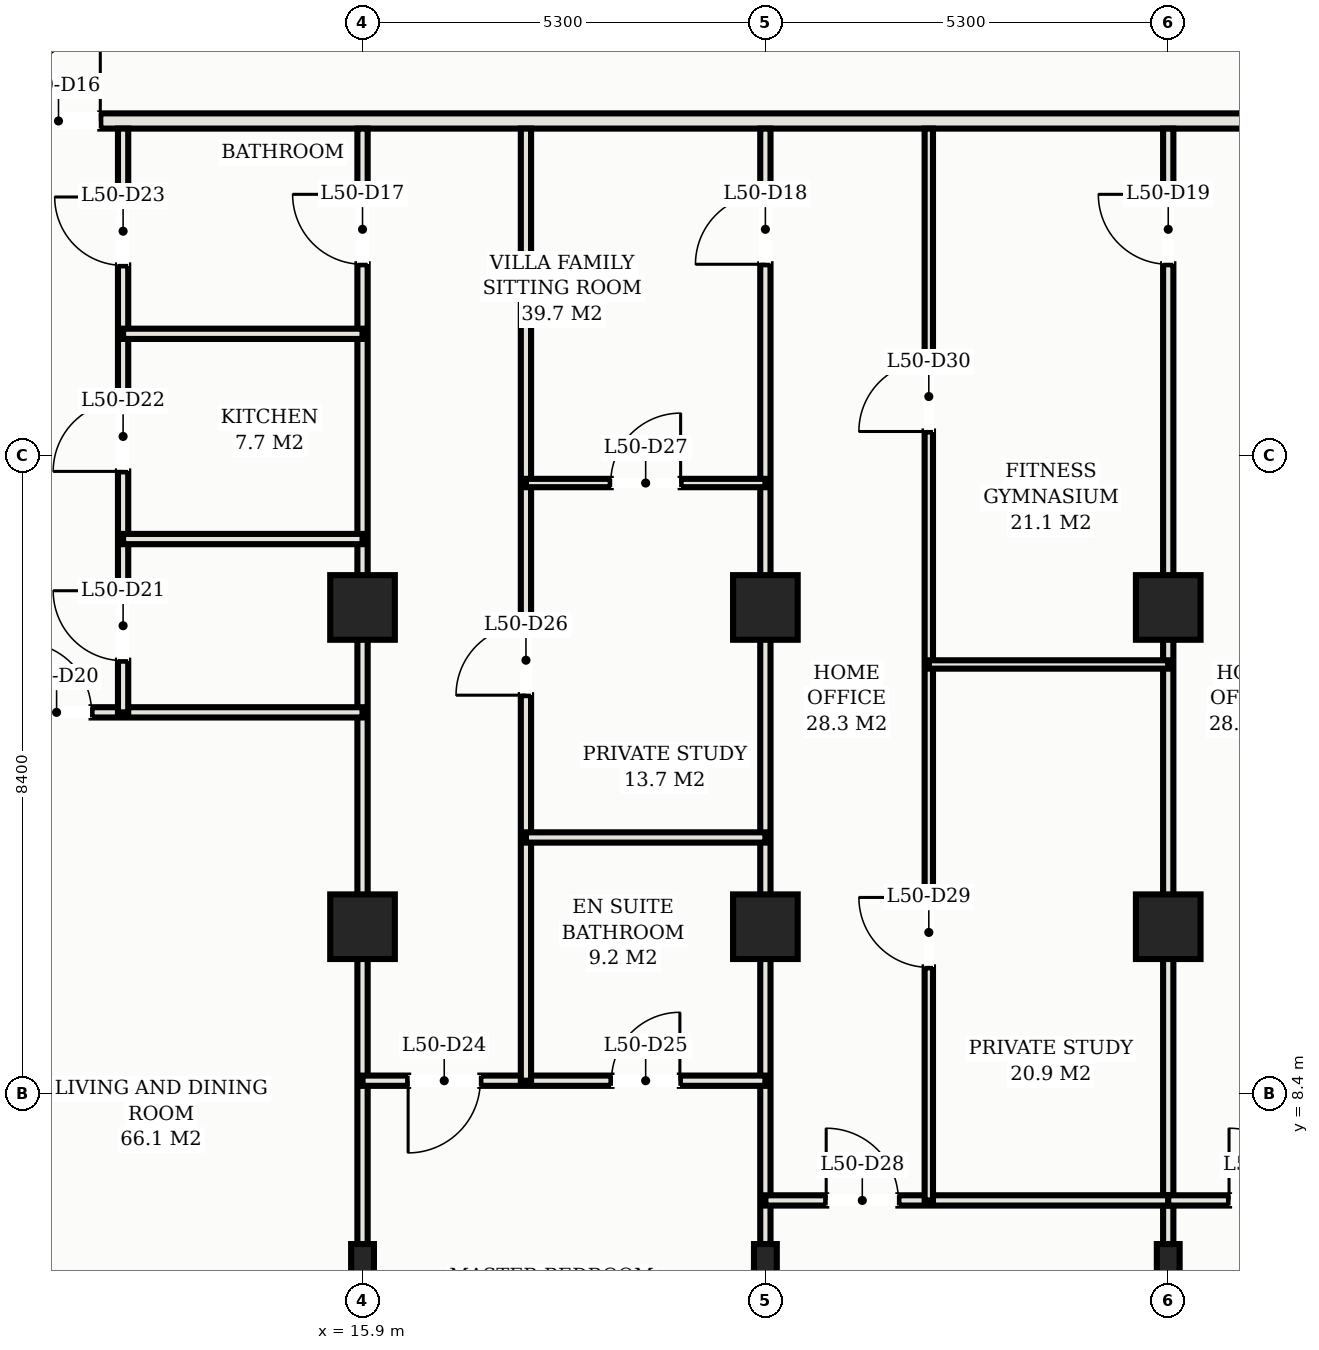
"""IFC4 building model, lengths in metres.
Left out: names, types, materials, properties, quantities, classifications, styles, units other than length and angle.
Written with IfcOpenShell. Run it as: python <this file> out.ifc"""

import sys

from ifc_helpers import new_model, si_unit, direction, frame, frame_2d, origin, origin_2d, place, context, subcontext, project, spatial, rectangle, hollow_rectangle, extrude, element, fill, save


model = new_model("IFC4")
c1 = context("Model", 3, precision=1e-05, world=origin(), true_north=direction((0.0, 1.0)))
c2 = subcontext(c1, "Body", "Model", "MODEL_VIEW")
j1 = project(units=[si_unit("LENGTHUNIT", "METRE"), si_unit("PLANEANGLEUNIT", "RADIAN")], contexts=[c1])
p1 = place(None, origin())
s1 = spatial("IfcSite", under=j1, at=p1, CompositionType="ELEMENT")
p2 = place(p1, origin())
s2 = spatial("IfcBuilding", under=s1, at=p2, CompositionType="ELEMENT")
p3 = place(p2, frame((0.0, 0.0, 182.1)))
s3 = spatial("IfcBuildingStorey", under=s2, at=p3, CompositionType="ELEMENT", Elevation=182.1)
for number, where, z_axis, x_axis in (
    (1, (15.9, 14.8, 0.0), (0.0, 0.0, 1.0), (1.0, 0.0, 0.0)),
    (2, (15.9, 10.6, 0.0), (0.0, 0.0, 1.0), (1.0, 0.0, 0.0)),
    (3, (21.2, 14.8, 0.0), (0.0, 0.0, 1.0), (1.0, 0.0, 0.0)),
    (4, (21.2, 10.6, 0.0), (0.0, 0.0, 1.0), (1.0, 0.0, 0.0)),
    (5, (26.5, 14.8, 0.0), (0.0, 0.0, 1.0), (1.0, 0.0, 0.0)),
    (6, (26.5, 10.6, 0.0), (0.0, 0.0, 1.0), (1.0, 0.0, 0.0)),
):
    element("IfcColumn", number, at=place(p3, frame(where, z_axis=z_axis, x_axis=x_axis)), inside=s3, PredefinedType="COLUMN", context=c2, shape_type="SweptSolid", body=[
        extrude(hollow_rectangle(XDim=0.85, YDim=0.85, WallThickness=0.028, at=origin_2d()), origin(), (0.0, 0.0, 1.0), 3.3),
    ])
for number, where, z_axis, x_axis in (
    (7, (15.9, 6.2, 0.0), (0.0, 0.0, 1.0), (1.0, 0.0, 0.0)),
    (8, (21.2, 6.2, 0.0), (0.0, 0.0, 1.0), (1.0, 0.0, 0.0)),
    (9, (26.5, 6.2, 0.0), (0.0, 0.0, 1.0), (1.0, 0.0, 0.0)),
):
    element("IfcColumn", number, at=place(p3, frame(where, z_axis=z_axis, x_axis=x_axis)), inside=s3, PredefinedType="COLUMN", context=c2, shape_type="SweptSolid", body=[
        extrude(hollow_rectangle(XDim=0.3, YDim=0.45, WallThickness=0.016, at=origin_2d()), origin(), (0.0, 0.0, 1.0), 3.3),
    ])
p4 = place(p3, frame((4.32, 21.2, 0.0), z_axis=(0.0, 0.0, 1.0), x_axis=(1.0, 0.0, 0.0)))
e10 = element("IfcWall", 10, at=p4, inside=s3, PredefinedType="PARTITIONING", context=c2, shape_type="SweptSolid", body=[
    extrude(rectangle(XDim=44.36, YDim=0.2, at=frame_2d((22.18, 0.0))), origin(), (0.0, 0.0, 1.0), 2.57),
])
p5 = place(p4, frame((7.03, 0.0, 0.0)))
e11 = element("IfcOpeningElement", 11, at=p5, cuts=e10, PredefinedType="OPENING", context=c2, shape_type="SweptSolid", body=[
    extrude(rectangle(XDim=1.1, YDim=2.25, at=frame_2d((0.55, 1.125))), frame((0.0, 0.11, 0.0), z_axis=(0.0, -1.0, 0.0), x_axis=(1.0, 0.0, 0.0)), (0.0, 0.0, 1.0), 0.22),
])
p6 = place(p4, frame((28.23, 0.0, 0.0)))
e12 = element("IfcOpeningElement", 12, at=p6, cuts=e10, PredefinedType="OPENING", context=c2, shape_type="SweptSolid", body=[
    extrude(rectangle(XDim=1.1, YDim=2.25, at=frame_2d((0.55, 1.125))), frame((0.0, 0.11, 0.0), z_axis=(0.0, -1.0, 0.0), x_axis=(1.0, 0.0, 0.0)), (0.0, 0.0, 1.0), 0.22),
])
p7 = place(p4, frame((2.635, 0.0, 0.0)))
e13 = element("IfcOpeningElement", 13, at=p7, cuts=e10, PredefinedType="OPENING", context=c2, shape_type="SweptSolid", body=[
    extrude(rectangle(XDim=0.92, YDim=2.15, at=frame_2d((0.46, 1.075))), frame((0.0, 0.11, 0.0), z_axis=(0.0, -1.0, 0.0), x_axis=(1.0, 0.0, 0.0)), (0.0, 0.0, 1.0), 0.22),
])
p8 = place(p4, frame((40.805, 0.0, 0.0)))
e14 = element("IfcOpeningElement", 14, at=p8, cuts=e10, PredefinedType="OPENING", context=c2, shape_type="SweptSolid", body=[
    extrude(rectangle(XDim=0.92, YDim=2.15, at=frame_2d((0.46, 1.075))), frame((0.0, 0.11, 0.0), z_axis=(0.0, -1.0, 0.0), x_axis=(1.0, 0.0, 0.0)), (0.0, 0.0, 1.0), 0.22),
])
p9 = place(p3, frame((15.9, 3.62, 0.0), z_axis=(0.0, 0.0, 1.0), x_axis=(0.0, 1.0, 0.0)))
e15 = element("IfcWall", 15, at=p9, inside=s3, PredefinedType="PARTITIONING", context=c2, shape_type="SweptSolid", body=[
    extrude(rectangle(XDim=17.48, YDim=0.135, at=frame_2d((8.74, 0.0))), origin(), (0.0, 0.0, 1.0), 2.325),
])
p10 = place(p9, frame((15.695, 0.0, 0.0)))
e16 = element("IfcOpeningElement", 16, at=p10, cuts=e15, PredefinedType="OPENING", context=c2, shape_type="SweptSolid", body=[
    extrude(rectangle(XDim=0.92, YDim=2.15, at=frame_2d((0.46, 1.075))), frame((0.0, 0.078, 0.0), z_axis=(0.0, -1.0, 0.0), x_axis=(1.0, 0.0, 0.0)), (0.0, 0.0, 1.0), 0.155),
])
p11 = place(p3, frame((21.2, 2.508, 0.0), z_axis=(0.0, 0.0, 1.0), x_axis=(0.0, 1.0, 0.0)))
e17 = element("IfcWall", 17, at=p11, inside=s3, PredefinedType="PARTITIONING", context=c2, shape_type="SweptSolid", body=[
    extrude(rectangle(XDim=18.592, YDim=0.135, at=frame_2d((9.296, 0.0))), origin(), (0.0, 0.0, 1.0), 2.325),
])
p12 = place(p11, frame((16.807, 0.0, 0.0)))
e18 = element("IfcOpeningElement", 18, at=p12, cuts=e17, PredefinedType="OPENING", context=c2, shape_type="SweptSolid", body=[
    extrude(rectangle(XDim=0.92, YDim=2.15, at=frame_2d((0.46, 1.075))), frame((0.0, 0.078, 0.0), z_axis=(0.0, -1.0, 0.0), x_axis=(1.0, 0.0, 0.0)), (0.0, 0.0, 1.0), 0.155),
])
p13 = place(p3, frame((26.5, 1.82, 0.0), z_axis=(0.0, 0.0, 1.0), x_axis=(0.0, 1.0, 0.0)))
e19 = element("IfcWall", 19, at=p13, inside=s3, PredefinedType="PARTITIONING", context=c2, shape_type="SweptSolid", body=[
    extrude(rectangle(XDim=19.28, YDim=0.135, at=frame_2d((9.64, 0.0))), origin(), (0.0, 0.0, 1.0), 2.325),
])
p14 = place(p13, frame((17.495, 0.0, 0.0)))
e20 = element("IfcOpeningElement", 20, at=p14, cuts=e19, PredefinedType="OPENING", context=c2, shape_type="SweptSolid", body=[
    extrude(rectangle(XDim=0.92, YDim=2.15, at=frame_2d((0.46, 1.075))), frame((0.0, 0.078, 0.0), z_axis=(0.0, -1.0, 0.0), x_axis=(1.0, 0.0, 0.0)), (0.0, 0.0, 1.0), 0.155),
])
p15 = place(p3, frame((10.6, 13.42, 0.0), z_axis=(0.0, 0.0, 1.0), x_axis=(1.0, 0.0, 0.0)))
e21 = element("IfcWall", 21, at=p15, inside=s3, PredefinedType="PARTITIONING", context=c2, shape_type="SweptSolid", body=[
    extrude(rectangle(XDim=5.3, YDim=0.135, at=frame_2d((2.65, 0.0))), origin(), (0.0, 0.0, 1.0), 2.57),
])
p16 = place(p15, frame((0.815, 0.0, 0.0)))
e22 = element("IfcOpeningElement", 22, at=p16, cuts=e21, PredefinedType="OPENING", context=c2, shape_type="SweptSolid", body=[
    extrude(rectangle(XDim=0.92, YDim=2.15, at=frame_2d((0.46, 1.075))), frame((0.0, 0.078, 0.0), z_axis=(0.0, -1.0, 0.0), x_axis=(1.0, 0.0, 0.0)), (0.0, 0.0, 1.0), 0.155),
])
p17 = place(p3, frame((12.75, 13.42, 0.0), z_axis=(0.0, 0.0, 1.0), x_axis=(0.0, 1.0, 0.0)))
e23 = element("IfcWall", 23, at=p17, inside=s3, PredefinedType="PARTITIONING", context=c2, shape_type="SweptSolid", body=[
    extrude(rectangle(XDim=7.68, YDim=0.135, at=frame_2d((3.84, 0.0))), origin(), (0.0, 0.0, 1.0), 2.57),
])
p18 = place(p17, frame((0.68, 0.0, 0.0)))
e24 = element("IfcOpeningElement", 24, at=p18, cuts=e23, PredefinedType="OPENING", context=c2, shape_type="SweptSolid", body=[
    extrude(rectangle(XDim=0.92, YDim=2.15, at=frame_2d((0.46, 1.075))), frame((0.0, 0.078, 0.0), z_axis=(0.0, -1.0, 0.0), x_axis=(1.0, 0.0, 0.0)), (0.0, 0.0, 1.0), 0.155),
])
p19 = place(p17, frame((3.17, 0.0, 0.0)))
e25 = element("IfcOpeningElement", 25, at=p19, cuts=e23, PredefinedType="OPENING", context=c2, shape_type="SweptSolid", body=[
    extrude(rectangle(XDim=0.92, YDim=2.15, at=frame_2d((0.46, 1.075))), frame((0.0, 0.078, 0.0), z_axis=(0.0, -1.0, 0.0), x_axis=(1.0, 0.0, 0.0)), (0.0, 0.0, 1.0), 0.155),
])
p20 = place(p17, frame((5.88, 0.0, 0.0)))
e26 = element("IfcOpeningElement", 26, at=p20, cuts=e23, PredefinedType="OPENING", context=c2, shape_type="SweptSolid", body=[
    extrude(rectangle(XDim=0.9, YDim=2.15, at=frame_2d((0.45, 1.075))), frame((0.0, 0.078, 0.0), z_axis=(0.0, -1.0, 0.0), x_axis=(1.0, 0.0, 0.0)), (0.0, 0.0, 1.0), 0.155),
])
for number, where, z_axis, x_axis in (
    (27, (12.75, 15.7, 0.0), (0.0, 0.0, 1.0), (1.0, 0.0, 0.0)),
    (28, (12.75, 18.4, 0.0), (0.0, 0.0, 1.0), (1.0, 0.0, 0.0)),
):
    element("IfcWall", number, at=place(p3, frame(where, z_axis=z_axis, x_axis=x_axis)), inside=s3, PredefinedType="PARTITIONING", context=c2, shape_type="SweptSolid", body=[
        extrude(rectangle(XDim=3.15, YDim=0.135, at=frame_2d((1.575, 0.0))), origin(), (0.0, 0.0, 1.0), 2.57),
    ])
p21 = place(p3, frame((15.9, 8.574, 0.0), z_axis=(0.0, 0.0, 1.0), x_axis=(1.0, 0.0, 0.0)))
e29 = element("IfcWall", 29, at=p21, inside=s3, PredefinedType="PARTITIONING", context=c2, shape_type="SweptSolid", body=[
    extrude(rectangle(XDim=5.3, YDim=0.135, at=frame_2d((2.65, 0.0))), origin(), (0.0, 0.0, 1.0), 2.57),
])
p22 = place(p21, frame((0.6, 0.0, 0.0)))
e30 = element("IfcOpeningElement", 30, at=p22, cuts=e29, PredefinedType="OPENING", context=c2, shape_type="SweptSolid", body=[
    extrude(rectangle(XDim=0.95, YDim=2.15, at=frame_2d((0.475, 1.075))), frame((0.0, 0.078, 0.0), z_axis=(0.0, -1.0, 0.0), x_axis=(1.0, 0.0, 0.0)), (0.0, 0.0, 1.0), 0.155),
])
p23 = place(p21, frame((3.275, 0.0, 0.0)))
e31 = element("IfcOpeningElement", 31, at=p23, cuts=e29, PredefinedType="OPENING", context=c2, shape_type="SweptSolid", body=[
    extrude(rectangle(XDim=0.9, YDim=2.15, at=frame_2d((0.45, 1.075))), frame((0.0, 0.078, 0.0), z_axis=(0.0, -1.0, 0.0), x_axis=(1.0, 0.0, 0.0)), (0.0, 0.0, 1.0), 0.155),
])
p24 = place(p3, frame((18.05, 8.574, 0.0), z_axis=(0.0, 0.0, 1.0), x_axis=(0.0, 1.0, 0.0)))
e32 = element("IfcWall", 32, at=p24, inside=s3, PredefinedType="PARTITIONING", context=c2, shape_type="SweptSolid", body=[
    extrude(rectangle(XDim=12.526, YDim=0.135, at=frame_2d((6.263, 0.0))), origin(), (0.0, 0.0, 1.0), 2.57),
])
p25 = place(p24, frame((5.072, 0.0, 0.0)))
e33 = element("IfcOpeningElement", 33, at=p25, cuts=e32, PredefinedType="OPENING", context=c2, shape_type="SweptSolid", body=[
    extrude(rectangle(XDim=0.92, YDim=2.15, at=frame_2d((0.46, 1.075))), frame((0.0, 0.078, 0.0), z_axis=(0.0, -1.0, 0.0), x_axis=(1.0, 0.0, 0.0)), (0.0, 0.0, 1.0), 0.155),
])
p26 = place(p3, frame((18.05, 11.774, 0.0), z_axis=(0.0, 0.0, 1.0), x_axis=(1.0, 0.0, 0.0)))
e34 = element("IfcWall", 34, at=p26, inside=s3, PredefinedType="PARTITIONING", context=c2, shape_type="SweptSolid", body=[
    extrude(rectangle(XDim=3.15, YDim=0.135, at=frame_2d((1.575, 0.0))), origin(), (0.0, 0.0, 1.0), 2.57),
])
p27 = place(p3, frame((18.05, 16.437, 0.0), z_axis=(0.0, 0.0, 1.0), x_axis=(1.0, 0.0, 0.0)))
e35 = element("IfcWall", 35, at=p27, inside=s3, PredefinedType="MOVABLE", context=c2, shape_type="SweptSolid", body=[
    extrude(rectangle(XDim=3.15, YDim=0.11, at=frame_2d((1.575, 0.0))), origin(), (0.0, 0.0, 1.0), 2.57),
])
p28 = place(p27, frame((1.115, 0.0, 0.0)))
e36 = element("IfcOpeningElement", 36, at=p28, cuts=e35, PredefinedType="OPENING", context=c2, shape_type="SweptSolid", body=[
    extrude(rectangle(XDim=0.92, YDim=2.15, at=frame_2d((0.46, 1.075))), frame((0.0, 0.065, 0.0), z_axis=(0.0, -1.0, 0.0), x_axis=(1.0, 0.0, 0.0)), (0.0, 0.0, 1.0), 0.13),
])
p29 = place(p3, frame((21.2, 6.999, 0.0), z_axis=(0.0, 0.0, 1.0), x_axis=(1.0, 0.0, 0.0)))
e37 = element("IfcWall", 37, at=p29, inside=s3, PredefinedType="PARTITIONING", context=c2, shape_type="SweptSolid", body=[
    extrude(rectangle(XDim=5.3, YDim=0.135, at=frame_2d((2.65, 0.0))), origin(), (0.0, 0.0, 1.0), 2.57),
])
p30 = place(p29, frame((0.8, 0.0, 0.0)))
e38 = element("IfcOpeningElement", 38, at=p30, cuts=e37, PredefinedType="OPENING", context=c2, shape_type="SweptSolid", body=[
    extrude(rectangle(XDim=0.95, YDim=2.15, at=frame_2d((0.475, 1.075))), frame((0.0, 0.078, 0.0), z_axis=(0.0, -1.0, 0.0), x_axis=(1.0, 0.0, 0.0)), (0.0, 0.0, 1.0), 0.155),
])
p31 = place(p3, frame((23.35, 6.999, 0.0), z_axis=(0.0, 0.0, 1.0), x_axis=(0.0, 1.0, 0.0)))
e39 = element("IfcWall", 39, at=p31, inside=s3, PredefinedType="MOVABLE", context=c2, shape_type="SweptSolid", body=[
    extrude(rectangle(XDim=14.101, YDim=0.11, at=frame_2d((7.051, 0.0))), origin(), (0.0, 0.0, 1.0), 2.57),
])
p32 = place(p31, frame((3.066, 0.0, 0.0)))
e40 = element("IfcOpeningElement", 40, at=p32, cuts=e39, PredefinedType="OPENING", context=c2, shape_type="SweptSolid", body=[
    extrude(rectangle(XDim=0.92, YDim=2.15, at=frame_2d((0.46, 1.075))), frame((0.0, 0.065, 0.0), z_axis=(0.0, -1.0, 0.0), x_axis=(1.0, 0.0, 0.0)), (0.0, 0.0, 1.0), 0.13),
])
p33 = place(p31, frame((10.116, 0.0, 0.0)))
e41 = element("IfcOpeningElement", 41, at=p33, cuts=e39, PredefinedType="OPENING", context=c2, shape_type="SweptSolid", body=[
    extrude(rectangle(XDim=0.92, YDim=2.15, at=frame_2d((0.46, 1.075))), frame((0.0, 0.065, 0.0), z_axis=(0.0, -1.0, 0.0), x_axis=(1.0, 0.0, 0.0)), (0.0, 0.0, 1.0), 0.13),
])
p34 = place(p3, frame((23.35, 14.05, 0.0), z_axis=(0.0, 0.0, 1.0), x_axis=(1.0, 0.0, 0.0)))
e42 = element("IfcWall", 42, at=p34, inside=s3, PredefinedType="MOVABLE", context=c2, shape_type="SweptSolid", body=[
    extrude(rectangle(XDim=3.15, YDim=0.11, at=frame_2d((1.575, 0.0))), origin(), (0.0, 0.0, 1.0), 2.57),
])
p35 = place(p3, frame((26.5, 6.999, 0.0), z_axis=(0.0, 0.0, 1.0), x_axis=(1.0, 0.0, 0.0)))
e43 = element("IfcWall", 43, at=p35, inside=s3, PredefinedType="PARTITIONING", context=c2, shape_type="SweptSolid", body=[
    extrude(rectangle(XDim=5.3, YDim=0.135, at=frame_2d((2.65, 0.0))), origin(), (0.0, 0.0, 1.0), 2.57),
])
p36 = place(p35, frame((0.8, 0.0, 0.0)))
e44 = element("IfcOpeningElement", 44, at=p36, cuts=e43, PredefinedType="OPENING", context=c2, shape_type="SweptSolid", body=[
    extrude(rectangle(XDim=0.95, YDim=2.15, at=frame_2d((0.475, 1.075))), frame((0.0, 0.078, 0.0), z_axis=(0.0, -1.0, 0.0), x_axis=(1.0, 0.0, 0.0)), (0.0, 0.0, 1.0), 0.155),
])
p37 = place(p5, origin())
e45 = element("IfcDoor", 45, at=p37, inside=s3, OperationType="SINGLE_SWING_RIGHT", PredefinedType="DOOR", context=c2, shape_type="SweptSolid", body=[
    extrude(rectangle(XDim=1.1, YDim=2.25, at=frame_2d((0.55, 1.125))), frame((0.0, 0.025, 0.0), z_axis=(0.0, -1.0, 0.0), x_axis=(1.0, 0.0, 0.0)), (0.0, 0.0, 1.0), 0.05),
])
fill(e11, e45)
p38 = place(p10, origin())
e46 = element("IfcDoor", 46, at=p38, inside=s3, OperationType="SINGLE_SWING_RIGHT", PredefinedType="DOOR", context=c2, shape_type="SweptSolid", body=[
    extrude(rectangle(XDim=0.92, YDim=2.15, at=frame_2d((0.46, 1.075))), frame((0.0, 0.025, 0.0), z_axis=(0.0, -1.0, 0.0), x_axis=(1.0, 0.0, 0.0)), (0.0, 0.0, 1.0), 0.05),
])
fill(e16, e46)
p39 = place(p12, origin())
e47 = element("IfcDoor", 47, at=p39, inside=s3, OperationType="SINGLE_SWING_LEFT", PredefinedType="DOOR", context=c2, shape_type="SweptSolid", body=[
    extrude(rectangle(XDim=0.92, YDim=2.15, at=frame_2d((0.46, 1.075))), frame((0.0, 0.025, 0.0), z_axis=(0.0, -1.0, 0.0), x_axis=(1.0, 0.0, 0.0)), (0.0, 0.0, 1.0), 0.05),
])
fill(e18, e47)
p40 = place(p14, origin())
e48 = element("IfcDoor", 48, at=p40, inside=s3, OperationType="SINGLE_SWING_RIGHT", PredefinedType="DOOR", context=c2, shape_type="SweptSolid", body=[
    extrude(rectangle(XDim=0.92, YDim=2.15, at=frame_2d((0.46, 1.075))), frame((0.0, 0.025, 0.0), z_axis=(0.0, -1.0, 0.0), x_axis=(1.0, 0.0, 0.0)), (0.0, 0.0, 1.0), 0.05),
])
fill(e20, e48)
p41 = place(p16, origin())
e49 = element("IfcDoor", 49, at=p41, inside=s3, OperationType="SINGLE_SWING_LEFT", PredefinedType="DOOR", context=c2, shape_type="SweptSolid", body=[
    extrude(rectangle(XDim=0.92, YDim=2.15, at=frame_2d((0.46, 1.075))), frame((0.0, 0.025, 0.0), z_axis=(0.0, -1.0, 0.0), x_axis=(1.0, 0.0, 0.0)), (0.0, 0.0, 1.0), 0.05),
])
fill(e22, e49)
p42 = place(p18, origin())
e50 = element("IfcDoor", 50, at=p42, inside=s3, OperationType="SINGLE_SWING_RIGHT", PredefinedType="DOOR", context=c2, shape_type="SweptSolid", body=[
    extrude(rectangle(XDim=0.92, YDim=2.15, at=frame_2d((0.46, 1.075))), frame((0.0, 0.025, 0.0), z_axis=(0.0, -1.0, 0.0), x_axis=(1.0, 0.0, 0.0)), (0.0, 0.0, 1.0), 0.05),
])
fill(e24, e50)
p43 = place(p19, origin())
e51 = element("IfcDoor", 51, at=p43, inside=s3, OperationType="SINGLE_SWING_LEFT", PredefinedType="DOOR", context=c2, shape_type="SweptSolid", body=[
    extrude(rectangle(XDim=0.92, YDim=2.15, at=frame_2d((0.46, 1.075))), frame((0.0, 0.025, 0.0), z_axis=(0.0, -1.0, 0.0), x_axis=(1.0, 0.0, 0.0)), (0.0, 0.0, 1.0), 0.05),
])
fill(e25, e51)
p44 = place(p20, origin())
e52 = element("IfcDoor", 52, at=p44, inside=s3, OperationType="SINGLE_SWING_RIGHT", PredefinedType="DOOR", context=c2, shape_type="SweptSolid", body=[
    extrude(rectangle(XDim=0.9, YDim=2.15, at=frame_2d((0.45, 1.075))), frame((0.0, 0.025, 0.0), z_axis=(0.0, -1.0, 0.0), x_axis=(1.0, 0.0, 0.0)), (0.0, 0.0, 1.0), 0.05),
])
fill(e26, e52)
p45 = place(p22, frame((0.95, 0.0, 0.0), z_axis=(0.0, 0.0, 1.0), x_axis=(-1.0, 0.0, 0.0)))
e53 = element("IfcDoor", 53, at=p45, inside=s3, OperationType="SINGLE_SWING_RIGHT", PredefinedType="DOOR", context=c2, shape_type="SweptSolid", body=[
    extrude(rectangle(XDim=0.95, YDim=2.15, at=frame_2d((0.475, 1.075))), frame((0.0, 0.025, 0.0), z_axis=(0.0, -1.0, 0.0), x_axis=(1.0, 0.0, 0.0)), (0.0, 0.0, 1.0), 0.05),
])
fill(e30, e53)
p46 = place(p23, origin())
e54 = element("IfcDoor", 54, at=p46, inside=s3, OperationType="SINGLE_SWING_RIGHT", PredefinedType="DOOR", context=c2, shape_type="SweptSolid", body=[
    extrude(rectangle(XDim=0.9, YDim=2.15, at=frame_2d((0.45, 1.075))), frame((0.0, 0.025, 0.0), z_axis=(0.0, -1.0, 0.0), x_axis=(1.0, 0.0, 0.0)), (0.0, 0.0, 1.0), 0.05),
])
fill(e31, e54)
p47 = place(p25, origin())
e55 = element("IfcDoor", 55, at=p47, inside=s3, OperationType="SINGLE_SWING_LEFT", PredefinedType="DOOR", context=c2, shape_type="SweptSolid", body=[
    extrude(rectangle(XDim=0.92, YDim=2.15, at=frame_2d((0.46, 1.075))), frame((0.0, 0.025, 0.0), z_axis=(0.0, -1.0, 0.0), x_axis=(1.0, 0.0, 0.0)), (0.0, 0.0, 1.0), 0.05),
])
fill(e33, e55)
p48 = place(p28, origin())
e56 = element("IfcDoor", 56, at=p48, inside=s3, OperationType="SINGLE_SWING_RIGHT", PredefinedType="DOOR", context=c2, shape_type="SweptSolid", body=[
    extrude(rectangle(XDim=0.92, YDim=2.15, at=frame_2d((0.46, 1.075))), frame((0.0, 0.025, 0.0), z_axis=(0.0, -1.0, 0.0), x_axis=(1.0, 0.0, 0.0)), (0.0, 0.0, 1.0), 0.05),
])
fill(e36, e56)
p49 = place(p30, origin())
e57 = element("IfcDoor", 57, at=p49, inside=s3, OperationType="SINGLE_SWING_LEFT", PredefinedType="DOOR", context=c2, shape_type="SweptSolid", body=[
    extrude(rectangle(XDim=0.95, YDim=2.15, at=frame_2d((0.475, 1.075))), frame((0.0, 0.025, 0.0), z_axis=(0.0, -1.0, 0.0), x_axis=(1.0, 0.0, 0.0)), (0.0, 0.0, 1.0), 0.05),
])
fill(e38, e57)
p50 = place(p32, origin())
e58 = element("IfcDoor", 58, at=p50, inside=s3, OperationType="SINGLE_SWING_RIGHT", PredefinedType="DOOR", context=c2, shape_type="SweptSolid", body=[
    extrude(rectangle(XDim=0.92, YDim=2.15, at=frame_2d((0.46, 1.075))), frame((0.0, 0.025, 0.0), z_axis=(0.0, -1.0, 0.0), x_axis=(1.0, 0.0, 0.0)), (0.0, 0.0, 1.0), 0.05),
])
fill(e40, e58)
p51 = place(p33, origin())
e59 = element("IfcDoor", 59, at=p51, inside=s3, OperationType="SINGLE_SWING_LEFT", PredefinedType="DOOR", context=c2, shape_type="SweptSolid", body=[
    extrude(rectangle(XDim=0.92, YDim=2.15, at=frame_2d((0.46, 1.075))), frame((0.0, 0.025, 0.0), z_axis=(0.0, -1.0, 0.0), x_axis=(1.0, 0.0, 0.0)), (0.0, 0.0, 1.0), 0.05),
])
fill(e41, e59)
p52 = place(p36, origin())
e60 = element("IfcDoor", 60, at=p52, inside=s3, OperationType="SINGLE_SWING_LEFT", PredefinedType="DOOR", context=c2, shape_type="SweptSolid", body=[
    extrude(rectangle(XDim=0.95, YDim=2.15, at=frame_2d((0.475, 1.075))), frame((0.0, 0.025, 0.0), z_axis=(0.0, -1.0, 0.0), x_axis=(1.0, 0.0, 0.0)), (0.0, 0.0, 1.0), 0.05),
])
fill(e44, e60)
save(model, sys.argv[1])
